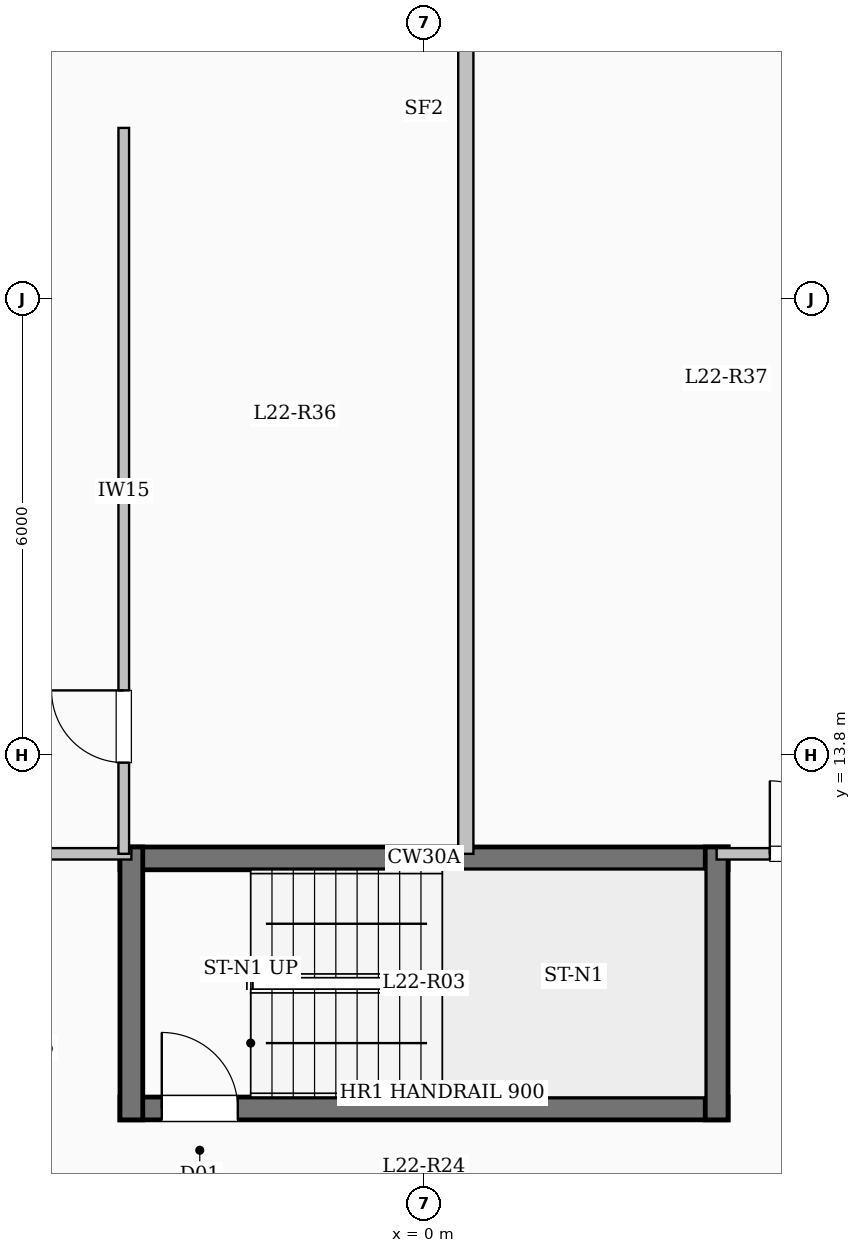
"""IFC4 building model, lengths in metres.
Left out: names, types, materials, properties, quantities, classifications, styles, units other than length and angle.
Written with IfcOpenShell. Run it as: python <this file> out.ifc"""

import sys

from ifc_helpers import new_model, si_unit, direction, frame, frame_2d, origin, place, context, subcontext, project, spatial, rectangle, extrude, element, fill, save


model = new_model("IFC4")
c1 = context("Model", 3, precision=1e-05, world=origin(), true_north=direction((0.0, 1.0)))
c2 = subcontext(c1, "Body", "Model", "MODEL_VIEW")
j1 = project(units=[si_unit("LENGTHUNIT", "METRE"), si_unit("PLANEANGLEUNIT", "RADIAN")], contexts=[c1])
p1 = place(None, origin())
s1 = spatial("IfcSite", under=j1, at=p1, CompositionType="ELEMENT")
p2 = place(p1, origin())
s2 = spatial("IfcBuilding", under=s1, at=p2, CompositionType="ELEMENT")
p3 = place(p2, frame((0.0, 0.0, 85.0)))
s3 = spatial("IfcBuildingStorey", under=s2, at=p3, CompositionType="ELEMENT", Elevation=85.0)
p4 = place(p3, frame((-7.35, 22.05, 0.0), z_axis=(0.0, 0.0, 1.0), x_axis=(0.894427191, 0.4472135955, 0.0)))
e1 = element("IfcWall", 1, at=p4, inside=s3, PredefinedType="SOLIDWALL", context=c2, shape_type="SweptSolid", body=[
    extrude(rectangle(XDim=3.354, YDim=0.28, at=frame_2d((1.677, 0.0))), origin(), (0.0, 0.0, 1.0), 3.1),
])
p5 = place(p4, frame((0.501, 0.0, 0.95)))
e2 = element("IfcOpeningElement", 2, at=p5, cuts=e1, PredefinedType="OPENING", context=c2, shape_type="SweptSolid", body=[
    extrude(rectangle(XDim=1.2, YDim=1.5, at=frame_2d((0.6, 0.75))), frame((0.0, 0.15, 0.0), z_axis=(0.0, -1.0, 0.0), x_axis=(1.0, 0.0, 0.0)), (0.0, 0.0, 1.0), 0.3),
])
p6 = place(p3, frame((4.35, 23.55, 0.0), z_axis=(0.0, 0.0, 1.0), x_axis=(0.894427191, -0.4472135955, 0.0)))
e3 = element("IfcWall", 3, at=p6, inside=s3, PredefinedType="SOLIDWALL", context=c2, shape_type="SweptSolid", body=[
    extrude(rectangle(XDim=3.354, YDim=0.28, at=frame_2d((1.677, 0.0))), origin(), (0.0, 0.0, 1.0), 3.1),
])
p7 = place(p6, frame((1.653, 0.0, 0.95)))
e4 = element("IfcOpeningElement", 4, at=p7, cuts=e3, PredefinedType="OPENING", context=c2, shape_type="SweptSolid", body=[
    extrude(rectangle(XDim=1.2, YDim=1.5, at=frame_2d((0.6, 0.75))), frame((0.0, 0.15, 0.0), z_axis=(0.0, -1.0, 0.0), x_axis=(1.0, 0.0, 0.0)), (0.0, 0.0, 1.0), 0.3),
])
p8 = place(p3, frame((-4.0, 12.44, 0.0), z_axis=(0.0, 0.0, 1.0), x_axis=(1.0, 0.0, 0.0)))
e5 = element("IfcWall", 5, at=p8, inside=s3, PredefinedType="SHEAR", context=c2, shape_type="SweptSolid", body=[
    extrude(rectangle(XDim=8.0, YDim=0.3, at=frame_2d((4.0, 0.0))), origin(), (0.0, 0.0, 1.0), 3.35),
])
p9 = place(p3, frame((-4.0, 9.15, 0.0), z_axis=(0.0, 0.0, 1.0), x_axis=(1.0, 0.0, 0.0)))
e6 = element("IfcWall", 6, at=p9, inside=s3, PredefinedType="SHEAR", context=c2, shape_type="SweptSolid", body=[
    extrude(rectangle(XDim=8.0, YDim=0.3, at=frame_2d((4.0, 0.0))), origin(), (0.0, 0.0, 1.0), 3.35),
])
p10 = place(p9, frame((0.55, 0.0, 0.0)))
e7 = element("IfcOpeningElement", 7, at=p10, cuts=e6, PredefinedType="OPENING", context=c2, shape_type="SweptSolid", body=[
    extrude(rectangle(XDim=1.0, YDim=2.15, at=frame_2d((0.5, 1.075))), frame((0.0, 0.16, 0.0), z_axis=(0.0, -1.0, 0.0), x_axis=(1.0, 0.0, 0.0)), (0.0, 0.0, 1.0), 0.32),
])
for number, where, z_axis, x_axis in (
    (8, (-3.85, 9.0, 0.0), (0.0, 0.0, 1.0), (0.0, 1.0, 0.0)),
    (9, (3.85, 9.0, 0.0), (0.0, 0.0, 1.0), (0.0, 1.0, 0.0)),
):
    element("IfcWall", number, at=place(p3, frame(where, z_axis=z_axis, x_axis=x_axis)), inside=s3, PredefinedType="SHEAR", context=c2, shape_type="SweptSolid", body=[
        extrude(rectangle(XDim=3.59, YDim=0.3, at=frame_2d((1.795, 0.0))), origin(), (0.0, 0.0, 1.0), 3.35),
    ])
p11 = place(p3, frame((-21.05, 12.5, 0.0), z_axis=(0.0, 0.0, 1.0), x_axis=(1.0, 0.0, 0.0)))
e10 = element("IfcWall", 10, at=p11, inside=s3, PredefinedType="PARTITIONING", context=c2, shape_type="SweptSolid", body=[
    extrude(rectangle(XDim=17.2, YDim=0.15, at=frame_2d((8.6, 0.0))), origin(), (0.0, 0.0, 1.0), 3.1),
])
p12 = place(p11, frame((2.562, 0.0, 0.0)))
e11 = element("IfcOpeningElement", 11, at=p12, cuts=e10, PredefinedType="OPENING", context=c2, shape_type="SweptSolid", body=[
    extrude(rectangle(XDim=0.95, YDim=2.15, at=frame_2d((0.475, 1.075))), frame((0.0, 0.085, 0.0), z_axis=(0.0, -1.0, 0.0), x_axis=(1.0, 0.0, 0.0)), (0.0, 0.0, 1.0), 0.17),
])
p13 = place(p11, frame((8.726, 0.0, 0.0)))
e12 = element("IfcOpeningElement", 12, at=p13, cuts=e10, PredefinedType="OPENING", context=c2, shape_type="SweptSolid", body=[
    extrude(rectangle(XDim=0.95, YDim=2.15, at=frame_2d((0.475, 1.075))), frame((0.0, 0.085, 0.0), z_axis=(0.0, -1.0, 0.0), x_axis=(1.0, 0.0, 0.0)), (0.0, 0.0, 1.0), 0.17),
])
p14 = place(p11, frame((14.21, 0.0, 0.0)))
e13 = element("IfcOpeningElement", 13, at=p14, cuts=e10, PredefinedType="OPENING", context=c2, shape_type="SweptSolid", body=[
    extrude(rectangle(XDim=0.95, YDim=2.15, at=frame_2d((0.475, 1.075))), frame((0.0, 0.085, 0.0), z_axis=(0.0, -1.0, 0.0), x_axis=(1.0, 0.0, 0.0)), (0.0, 0.0, 1.0), 0.17),
])
p15 = place(p3, frame((3.85, 12.5, 0.0), z_axis=(0.0, 0.0, 1.0), x_axis=(1.0, 0.0, 0.0)))
e14 = element("IfcWall", 14, at=p15, inside=s3, PredefinedType="PARTITIONING", context=c2, shape_type="SweptSolid", body=[
    extrude(rectangle(XDim=17.2, YDim=0.15, at=frame_2d((8.6, 0.0))), origin(), (0.0, 0.0, 1.0), 3.1),
])
p16 = place(p15, frame((0.7, 0.0, 0.0)))
e15 = element("IfcOpeningElement", 15, at=p16, cuts=e14, PredefinedType="OPENING", context=c2, shape_type="SweptSolid", body=[
    extrude(rectangle(XDim=0.96, YDim=2.15, at=frame_2d((0.48, 1.075))), frame((0.0, 0.085, 0.0), z_axis=(0.0, -1.0, 0.0), x_axis=(1.0, 0.0, 0.0)), (0.0, 0.0, 1.0), 0.17),
])
p17 = place(p3, frame((0.55, 12.5, 0.0), z_axis=(0.0, 0.0, 1.0), x_axis=(0.0, 1.0, 0.0)))
e16 = element("IfcWall", 16, at=p17, inside=s3, PredefinedType="SOLIDWALL", context=c2, shape_type="SweptSolid", body=[
    extrude(rectangle(XDim=11.08, YDim=0.2, at=frame_2d((5.54, 0.0))), origin(), (0.0, 0.0, 1.0), 3.1),
])
p18 = place(p3, frame((-3.95, 12.5, 0.0), z_axis=(0.0, 0.0, 1.0), x_axis=(0.0, 1.0, 0.0)))
e17 = element("IfcWall", 17, at=p18, inside=s3, PredefinedType="PARTITIONING", context=c2, shape_type="SweptSolid", body=[
    extrude(rectangle(XDim=9.55, YDim=0.14, at=frame_2d((4.775, 0.0))), origin(), (0.0, 0.0, 1.0), 3.1),
])
p19 = place(p18, frame((1.2, 0.0, 0.0)))
e18 = element("IfcOpeningElement", 18, at=p19, cuts=e17, PredefinedType="OPENING", context=c2, shape_type="SweptSolid", body=[
    extrude(rectangle(XDim=0.95, YDim=2.15, at=frame_2d((0.475, 1.075))), frame((0.0, 0.08, 0.0), z_axis=(0.0, -1.0, 0.0), x_axis=(1.0, 0.0, 0.0)), (0.0, 0.0, 1.0), 0.16),
])
p20 = place(p10, origin())
e19 = element("IfcDoor", 19, at=p20, inside=s3, OperationType="SINGLE_SWING_LEFT", PredefinedType="DOOR", context=c2, shape_type="SweptSolid", body=[
    extrude(rectangle(XDim=1.0, YDim=2.15, at=frame_2d((0.5, 1.075))), frame((0.0, 0.025, 0.0), z_axis=(0.0, -1.0, 0.0), x_axis=(1.0, 0.0, 0.0)), (0.0, 0.0, 1.0), 0.05),
])
fill(e7, e19)
p21 = place(p19, origin())
e20 = element("IfcDoor", 20, at=p21, inside=s3, OperationType="SINGLE_SWING_RIGHT", PredefinedType="DOOR", context=c2, shape_type="SweptSolid", body=[
    extrude(rectangle(XDim=0.95, YDim=2.15, at=frame_2d((0.475, 1.075))), frame((0.0, 0.025, 0.0), z_axis=(0.0, -1.0, 0.0), x_axis=(1.0, 0.0, 0.0)), (0.0, 0.0, 1.0), 0.05),
])
fill(e18, e20)
p22 = place(p16, origin())
e21 = element("IfcDoor", 21, at=p22, inside=s3, OperationType="SINGLE_SWING_LEFT", PredefinedType="DOOR", context=c2, shape_type="SweptSolid", body=[
    extrude(rectangle(XDim=0.96, YDim=2.15, at=frame_2d((0.48, 1.075))), frame((0.0, 0.025, 0.0), z_axis=(0.0, -1.0, 0.0), x_axis=(1.0, 0.0, 0.0)), (0.0, 0.0, 1.0), 0.05),
])
fill(e15, e21)
save(model, sys.argv[1])
